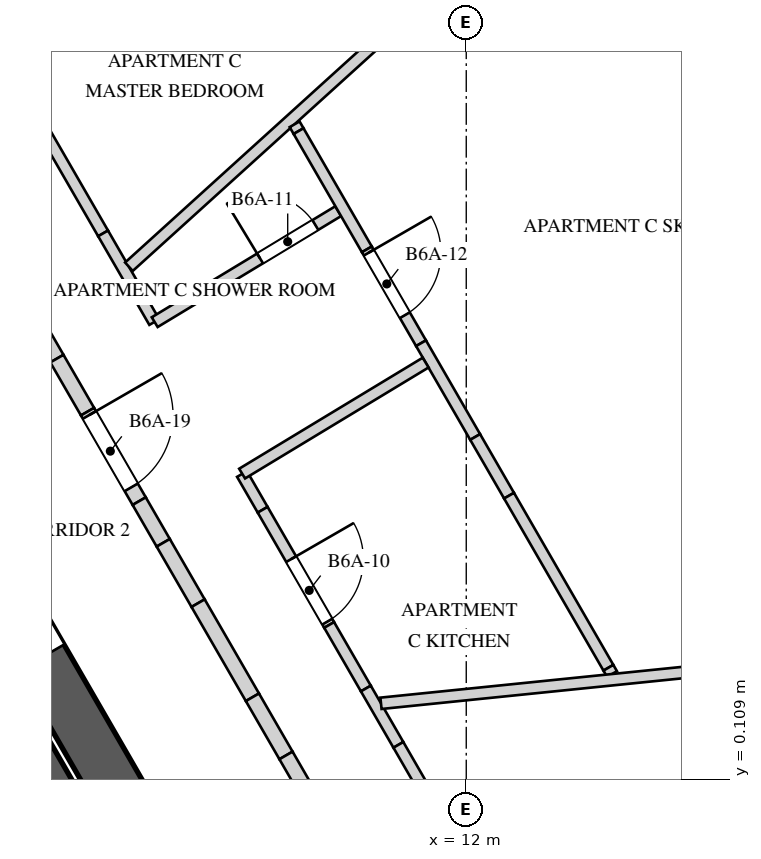
"""IFC4 building model, lengths in metres.
Left out: names, types, materials, properties, quantities, classifications, styles, units other than length and angle.
Written with IfcOpenShell. Run it as: python <this file> out.ifc"""

import sys

from ifc_helpers import new_model, si_unit, direction, frame, frame_2d, origin, place, context, subcontext, project, spatial, polyline, rectangle, outline, extrude, element, fill, save


model = new_model("IFC4")
c1 = context("Model", 3, precision=1e-05, world=origin(), true_north=direction((0.0, 1.0)))
c2 = subcontext(c1, "Body", "Model", "MODEL_VIEW")
j1 = project(units=[si_unit("LENGTHUNIT", "METRE"), si_unit("PLANEANGLEUNIT", "RADIAN")], contexts=[c1])
p1 = place(None, origin())
s1 = spatial("IfcSite", under=j1, at=p1, CompositionType="ELEMENT")
p2 = place(p1, origin())
s2 = spatial("IfcBuilding", under=s1, at=p2, CompositionType="ELEMENT")
p3 = place(p2, frame((0.0, 0.0, 245.2)))
s3 = spatial("IfcBuildingStorey", under=s2, at=p3, CompositionType="ELEMENT", Elevation=245.2)
p4 = place(p3, frame((9.844, -4.25, 0.0), z_axis=(0.0, 0.0, 1.0), x_axis=(-0.500003331888, 0.866023480109, 0.0)))
e1 = element("IfcWall", 1, at=p4, inside=s3, PredefinedType="SHEAR", context=c2, shape_type="SweptSolid", body=[
    extrude(rectangle(XDim=17.205, YDim=0.7, at=frame_2d((8.603, 0.0))), origin(), (0.0, 0.0, 1.0), 4.0),
])
p5 = place(p4, frame((6.877, 0.0, 0.0)))
e2 = element("IfcOpeningElement", 2, at=p5, cuts=e1, PredefinedType="OPENING", context=c2, shape_type="SweptSolid", body=[
    extrude(rectangle(XDim=1.0, YDim=2.4, at=frame_2d((0.5, 1.2))), frame((0.0, 0.36, 0.0), z_axis=(0.0, -1.0, 0.0), x_axis=(1.0, 0.0, 0.0)), (0.0, 0.0, 1.0), 0.72),
])
p6 = place(p3, frame((8.933, -4.172, 0.0), z_axis=(0.0, 0.0, 1.0), x_axis=(-0.500026960575, 0.86600983753, 0.0)))
e3 = element("IfcWall", 3, at=p6, inside=s3, PredefinedType="SOLIDWALL", context=c2, shape_type="SweptSolid", body=[
    extrude(rectangle(XDim=6.2, YDim=0.6, at=frame_2d((3.1, 0.0))), origin(), (0.0, 0.0, 1.0), 3.65),
])
p7 = place(p3, frame((4.934, 11.253, 0.0), z_axis=(0.0, 0.0, 1.0), x_axis=(0.500001111708, -0.866024761939, 0.0)))
e4 = element("IfcWall", 4, at=p7, inside=s3, PredefinedType="PARTITIONING", context=c2, shape_type="SweptSolid", body=[
    extrude(rectangle(XDim=4.576, YDim=0.15, at=frame_2d((2.288, 0.0))), origin(), (0.0, 0.0, 1.0), 3.65),
])
p8 = place(p7, frame((0.445, 0.0, 0.0)))
e5 = element("IfcOpeningElement", 5, at=p8, cuts=e4, PredefinedType="OPENING", context=c2, shape_type="SweptSolid", body=[
    extrude(rectangle(XDim=0.95, YDim=2.4, at=frame_2d((0.475, 1.2))), frame((0.0, 0.085, 0.0), z_axis=(0.0, -1.0, 0.0), x_axis=(1.0, 0.0, 0.0)), (0.0, 0.0, 1.0), 0.17),
])
p9 = place(p3, frame((7.222, 7.291, 0.0), z_axis=(0.0, 0.0, 1.0), x_axis=(0.500032254052, -0.866006781098, 0.0)))
e6 = element("IfcWall", 6, at=p9, inside=s3, PredefinedType="PARTITIONING", context=c2, shape_type="SweptSolid", body=[
    extrude(rectangle(XDim=0.796, YDim=0.15, at=frame_2d((0.398, 0.0))), origin(), (0.0, 0.0, 1.0), 2.75),
])
p10 = place(p3, frame((7.62, 6.602, 0.0), z_axis=(0.0, 0.0, 1.0), x_axis=(0.500093091412, -0.865971650761, 0.0)))
e7 = element("IfcWall", 7, at=p10, inside=s3, PredefinedType="PARTITIONING", context=c2, shape_type="SweptSolid", body=[
    extrude(rectangle(XDim=0.551, YDim=0.15, at=frame_2d((0.276, 0.0))), origin(), (0.0, 0.0, 1.0), 3.65),
])
p11 = place(p3, frame((7.562, 6.852, 0.0), z_axis=(0.0, 0.0, 1.0), x_axis=(0.741038665238, 0.671462356817, 0.0)))
e8 = element("IfcWall", 8, at=p11, inside=s3, PredefinedType="PARTITIONING", context=c2, shape_type="SweptSolid", body=[
    extrude(rectangle(XDim=10.057, YDim=0.15, at=frame_2d((5.028, 0.0))), origin(), (0.0, 0.0, 1.0), 2.75),
])
p12 = place(p3, frame((7.901, 6.123, 0.0), z_axis=(0.0, 0.0, 1.0), x_axis=(0.855708816302, 0.517457652087, 0.0)))
e9 = element("IfcWall", 9, at=p12, inside=s3, PredefinedType="PARTITIONING", context=c2, shape_type="SweptSolid", body=[
    extrude(rectangle(XDim=2.822, YDim=0.15, at=frame_2d((1.411, 0.0))), origin(), (0.0, 0.0, 1.0), 3.65),
])
p13 = place(p12, frame((1.62, 0.0, 0.0)))
e10 = element("IfcOpeningElement", 10, at=p13, cuts=e9, PredefinedType="OPENING", context=c2, shape_type="SweptSolid", body=[
    extrude(rectangle(XDim=0.85, YDim=2.4, at=frame_2d((0.425, 1.2))), frame((0.0, 0.085, 0.0), z_axis=(0.0, -1.0, 0.0), x_axis=(1.0, 0.0, 0.0)), (0.0, 0.0, 1.0), 0.17),
])
p14 = place(p3, frame((9.05, 4.125, 0.0), z_axis=(0.0, 0.0, 1.0), x_axis=(0.500007885066, -0.866020851292, 0.0)))
e11 = element("IfcWall", 11, at=p14, inside=s3, PredefinedType="PARTITIONING", context=c2, shape_type="SweptSolid", body=[
    extrude(rectangle(XDim=0.543, YDim=0.15, at=frame_2d((0.271, 0.0))), origin(), (0.0, 0.0, 1.0), 3.65),
])
p15 = place(p3, frame((9.321, 3.655, 0.0), z_axis=(0.0, 0.0, 1.0), x_axis=(0.499980071345, -0.866036909293, 0.0)))
e12 = element("IfcWall", 12, at=p15, inside=s3, PredefinedType="PARTITIONING", context=c2, shape_type="SweptSolid", body=[
    extrude(outline(polyline([(0.0, 0.0), (1.75, 0.0), (1.75, 3.65), (0.892, 3.65), (0.892, 2.55), (0.0, 2.55), (0.0, 0.0)])), frame((0.0, 0.075, 0.0), z_axis=(0.0, -1.0, 0.0), x_axis=(1.0, 0.0, 0.0)), (0.0, 0.0, 1.0), 0.15),
])
p16 = place(p15, frame((0.75, 0.0, 0.0)))
e13 = element("IfcOpeningElement", 13, at=p16, cuts=e12, PredefinedType="OPENING", context=c2, shape_type="SweptSolid", body=[
    extrude(rectangle(XDim=0.95, YDim=2.4, at=frame_2d((0.475, 1.2))), frame((0.0, 0.085, 0.0), z_axis=(0.0, -1.0, 0.0), x_axis=(1.0, 0.0, 0.0)), (0.0, 0.0, 1.0), 0.17),
])
p17 = place(p3, frame((10.196, 2.139, 0.0), z_axis=(0.0, 0.0, 1.0), x_axis=(0.500109093648, -0.865962409375, 0.0)))
e14 = element("IfcWall", 14, at=p17, inside=s3, PredefinedType="PARTITIONING", context=c2, shape_type="SweptSolid", body=[
    extrude(rectangle(XDim=0.966, YDim=0.15, at=frame_2d((0.483, 0.0))), origin(), (0.0, 0.0, 1.0), 3.65),
])
p18 = place(p3, frame((10.679, 1.303, 0.0), z_axis=(0.0, 0.0, 1.0), x_axis=(0.500035209441, -0.86600507465, 0.0)))
e15 = element("IfcWall", 15, at=p18, inside=s3, PredefinedType="PARTITIONING", context=c2, shape_type="SweptSolid", body=[
    extrude(rectangle(XDim=0.856, YDim=0.15, at=frame_2d((0.428, 0.0))), origin(), (0.0, 0.0, 1.0), 2.75),
])
p19 = place(p3, frame((11.107, 0.562, 0.0), z_axis=(0.0, 0.0, 1.0), x_axis=(0.499981090573, -0.866036320872, 0.0)))
e16 = element("IfcWall", 16, at=p19, inside=s3, PredefinedType="PARTITIONING", context=c2, shape_type="SweptSolid", body=[
    extrude(rectangle(XDim=5.556, YDim=0.15, at=frame_2d((2.778, 0.0))), origin(), (0.0, 0.0, 1.0), 3.65),
])
p20 = place(p19, frame((1.971, 0.0, 0.0)))
e17 = element("IfcOpeningElement", 17, at=p20, cuts=e16, PredefinedType="OPENING", context=c2, shape_type="SweptSolid", body=[
    extrude(rectangle(XDim=0.95, YDim=2.4, at=frame_2d((0.475, 1.2))), frame((0.0, 0.085, 0.0), z_axis=(0.0, -1.0, 0.0), x_axis=(1.0, 0.0, 0.0)), (0.0, 0.0, 1.0), 0.17),
])
p21 = place(p3, frame((9.742, 8.726, 0.0), z_axis=(0.0, 0.0, 1.0), x_axis=(0.500943559977, -0.865479953388, 0.0)))
e18 = element("IfcWall", 18, at=p21, inside=s3, PredefinedType="PARTITIONING", context=c2, shape_type="SweptSolid", body=[
    extrude(rectangle(XDim=0.104, YDim=0.15, at=frame_2d((0.052, 0.0))), origin(), (0.0, 0.0, 1.0), 2.75),
])
p22 = place(p3, frame((9.794, 8.636, 0.0), z_axis=(0.0, 0.0, 1.0), x_axis=(0.499953802258, -0.86605207442, 0.0)))
e19 = element("IfcWall", 19, at=p22, inside=s3, PredefinedType="PARTITIONING", context=c2, shape_type="SweptSolid", body=[
    extrude(rectangle(XDim=1.797, YDim=0.15, at=frame_2d((0.898, 0.0))), origin(), (0.0, 0.0, 1.0), 3.65),
])
p23 = place(p3, frame((10.692, 7.081, 0.0), z_axis=(0.0, 0.0, 1.0), x_axis=(0.499969479948, -0.866043023828, 0.0)))
e20 = element("IfcWall", 20, at=p23, inside=s3, PredefinedType="PARTITIONING", context=c2, shape_type="SweptSolid", body=[
    extrude(outline(polyline([(0.0, 0.0), (1.426, 0.0), (1.426, 2.55), (0.551, 2.55), (0.551, 3.65), (0.0, 3.65), (0.0, 0.0)])), frame((0.0, 0.075, 0.0), z_axis=(0.0, -1.0, 0.0), x_axis=(1.0, 0.0, 0.0)), (0.0, 0.0, 1.0), 0.15),
])
p24 = place(p23, frame((0.05, 0.0, 0.0)))
e21 = element("IfcOpeningElement", 21, at=p24, cuts=e20, PredefinedType="OPENING", context=c2, shape_type="SweptSolid", body=[
    extrude(rectangle(XDim=0.95, YDim=2.4, at=frame_2d((0.475, 1.2))), frame((0.0, 0.085, 0.0), z_axis=(0.0, -1.0, 0.0), x_axis=(1.0, 0.0, 0.0)), (0.0, 0.0, 1.0), 0.17),
])
p25 = place(p3, frame((11.405, 5.846, 0.0), z_axis=(0.0, 0.0, 1.0), x_axis=(0.500103350459, -0.865965726146, 0.0)))
e22 = element("IfcWall", 22, at=p25, inside=s3, PredefinedType="PARTITIONING", context=c2, shape_type="SweptSolid", body=[
    extrude(rectangle(XDim=1.424, YDim=0.15, at=frame_2d((0.712, 0.0))), origin(), (0.0, 0.0, 1.0), 3.65),
])
p26 = place(p3, frame((12.117, 4.613, 0.0), z_axis=(0.0, 0.0, 1.0), x_axis=(0.499967368674, -0.86604424267, 0.0)))
e23 = element("IfcWall", 23, at=p26, inside=s3, PredefinedType="PARTITIONING", context=c2, shape_type="SweptSolid", body=[
    extrude(rectangle(XDim=0.892, YDim=0.15, at=frame_2d((0.446, 0.0))), origin(), (0.0, 0.0, 1.0), 2.55),
])
p27 = place(p3, frame((12.563, 3.84, 0.0), z_axis=(0.0, 0.0, 1.0), x_axis=(0.500016176693, -0.866016063965, 0.0)))
e24 = element("IfcWall", 24, at=p27, inside=s3, PredefinedType="PARTITIONING", context=c2, shape_type="SweptSolid", body=[
    extrude(rectangle(XDim=2.614, YDim=0.15, at=frame_2d((1.307, 0.0))), origin(), (0.0, 0.0, 1.0), 3.65),
])
p28 = place(p3, frame((13.87, 1.576, 0.0), z_axis=(0.0, 0.0, 1.0), x_axis=(0.49972245349, -0.866185586049, 0.0)))
e25 = element("IfcWall", 25, at=p28, inside=s3, PredefinedType="PARTITIONING", context=c2, shape_type="SweptSolid", body=[
    extrude(rectangle(XDim=0.095, YDim=0.15, at=frame_2d((0.048, 0.0))), origin(), (0.0, 0.0, 1.0), 2.75),
])
p29 = place(p3, frame((11.466, 5.591, 0.0), z_axis=(0.0, 0.0, 1.0), x_axis=(-0.855670500176, -0.517521009359, 0.0)))
e26 = element("IfcWall", 26, at=p29, inside=s3, PredefinedType="PARTITIONING", context=c2, shape_type="SweptSolid", body=[
    extrude(rectangle(XDim=2.822, YDim=0.15, at=frame_2d((1.411, 0.0))), origin(), (0.0, 0.0, 1.0), 3.65),
])
p30 = place(p3, frame((20.157, 2.054, 0.0), z_axis=(0.0, 0.0, 1.0), x_axis=(-0.994848051669, -0.101377285871, 0.0)))
e27 = element("IfcWall", 27, at=p30, inside=s3, PredefinedType="PARTITIONING", context=c2, shape_type="SweptSolid", body=[
    extrude(rectangle(XDim=9.327, YDim=0.15, at=frame_2d((4.664, 0.0))), origin(), (0.0, 0.0, 1.0), 2.75),
])
p31 = place(p3, frame((6.204, 6.355, 0.0), z_axis=(0.0, 0.0, 1.0), x_axis=(0.499911126926, -0.866076708598, 0.0)))
e28 = element("IfcWall", 28, at=p31, inside=s3, PredefinedType="SOLIDWALL", context=c2, shape_type="SweptSolid", body=[
    extrude(rectangle(XDim=0.822, YDim=0.2, at=frame_2d((0.411, 0.0))), origin(), (0.0, 0.0, 1.0), 2.75),
])
p32 = place(p3, frame((6.615, 5.643, 0.0), z_axis=(0.0, 0.0, 1.0), x_axis=(0.499984757355, -0.866034203951, 0.0)))
e29 = element("IfcWall", 29, at=p32, inside=s3, PredefinedType="SOLIDWALL", context=c2, shape_type="SweptSolid", body=[
    extrude(rectangle(XDim=0.806, YDim=0.2, at=frame_2d((0.403, 0.0))), origin(), (0.0, 0.0, 1.0), 3.65),
])
p33 = place(p3, frame((7.017, 4.946, 0.0), z_axis=(0.0, 0.0, 1.0), x_axis=(0.499924531544, -0.866068971134, 0.0)))
e30 = element("IfcWall", 30, at=p33, inside=s3, PredefinedType="SOLIDWALL", context=c2, shape_type="SweptSolid", body=[
    extrude(outline(polyline([(0.0, 0.0), (1.36, 0.0), (1.359, 2.55), (0.459, 2.55), (0.459, 3.65), (0.0, 3.65), (0.0, 0.0)])), frame((0.0, 0.1, 0.0), z_axis=(0.0, -1.0, 0.0), x_axis=(1.0, 0.0, 0.0)), (0.0, 0.0, 1.0), 0.2),
])
p34 = place(p33, frame((0.05, 0.0, 0.0)))
e31 = element("IfcOpeningElement", 31, at=p34, cuts=e30, PredefinedType="OPENING", context=c2, shape_type="SweptSolid", body=[
    extrude(rectangle(XDim=1.1, YDim=2.4, at=frame_2d((0.55, 1.2))), frame((0.0, 0.11, 0.0), z_axis=(0.0, -1.0, 0.0), x_axis=(1.0, 0.0, 0.0)), (0.0, 0.0, 1.0), 0.22),
])
p35 = place(p3, frame((7.697, 3.768, 0.0), z_axis=(0.0, 0.0, 1.0), x_axis=(0.50012328804, -0.865954211699, 0.0)))
e32 = element("IfcWall", 32, at=p35, inside=s3, PredefinedType="SOLIDWALL", context=c2, shape_type="SweptSolid", body=[
    extrude(rectangle(XDim=0.633, YDim=0.2, at=frame_2d((0.316, 0.0))), origin(), (0.0, 0.0, 1.0), 3.65),
])
p36 = place(p3, frame((8.013, 3.22, 0.0), z_axis=(0.0, 0.0, 1.0), x_axis=(0.500175591747, -0.865924002104, 0.0)))
e33 = element("IfcWall", 33, at=p36, inside=s3, PredefinedType="SOLIDWALL", context=c2, shape_type="SweptSolid", body=[
    extrude(rectangle(XDim=0.917, YDim=0.2, at=frame_2d((0.458, 0.0))), origin(), (0.0, 0.0, 1.0), 2.55),
])
p37 = place(p3, frame((8.472, 2.426, 0.0), z_axis=(0.0, 0.0, 1.0), x_axis=(0.499904796234, -0.866080362727, 0.0)))
e34 = element("IfcWall", 34, at=p37, inside=s3, PredefinedType="SOLIDWALL", context=c2, shape_type="SweptSolid", body=[
    extrude(rectangle(XDim=1.429, YDim=0.2, at=frame_2d((0.715, 0.0))), origin(), (0.0, 0.0, 1.0), 3.65),
])
p38 = place(p3, frame((9.187, 1.188, 0.0), z_axis=(0.0, 0.0, 1.0), x_axis=(0.500121072013, -0.86595549154, 0.0)))
e35 = element("IfcWall", 35, at=p38, inside=s3, PredefinedType="SOLIDWALL", context=c2, shape_type="SweptSolid", body=[
    extrude(rectangle(XDim=0.884, YDim=0.2, at=frame_2d((0.442, 0.0))), origin(), (0.0, 0.0, 1.0), 2.75),
])
p39 = place(p3, frame((9.629, 0.423, 0.0), z_axis=(0.0, 0.0, 1.0), x_axis=(0.499995433041, -0.866028040503, 0.0)))
e36 = element("IfcWall", 36, at=p39, inside=s3, PredefinedType="SOLIDWALL", context=c2, shape_type="SweptSolid", body=[
    extrude(rectangle(XDim=5.161, YDim=0.2, at=frame_2d((2.581, 0.0))), origin(), (0.0, 0.0, 1.0), 3.65),
])
p40 = place(p16, origin())
e37 = element("IfcDoor", 37, at=p40, inside=s3, OperationType="SINGLE_SWING_RIGHT", PredefinedType="DOOR", context=c2, shape_type="SweptSolid", body=[
    extrude(rectangle(XDim=0.95, YDim=2.4, at=frame_2d((0.475, 1.2))), frame((0.0, 0.025, 0.0), z_axis=(0.0, -1.0, 0.0), x_axis=(1.0, 0.0, 0.0)), (0.0, 0.0, 1.0), 0.05),
])
fill(e13, e37)
p41 = place(p13, origin())
e38 = element("IfcDoor", 38, at=p41, inside=s3, OperationType="SINGLE_SWING_LEFT", PredefinedType="DOOR", context=c2, shape_type="SweptSolid", body=[
    extrude(rectangle(XDim=0.85, YDim=2.4, at=frame_2d((0.425, 1.2))), frame((0.0, 0.025, 0.0), z_axis=(0.0, -1.0, 0.0), x_axis=(1.0, 0.0, 0.0)), (0.0, 0.0, 1.0), 0.05),
])
fill(e10, e38)
p42 = place(p24, origin())
e39 = element("IfcDoor", 39, at=p42, inside=s3, OperationType="SINGLE_SWING_RIGHT", PredefinedType="DOOR", context=c2, shape_type="SweptSolid", body=[
    extrude(rectangle(XDim=0.95, YDim=2.4, at=frame_2d((0.475, 1.2))), frame((0.0, 0.025, 0.0), z_axis=(0.0, -1.0, 0.0), x_axis=(1.0, 0.0, 0.0)), (0.0, 0.0, 1.0), 0.05),
])
fill(e21, e39)
p43 = place(p34, origin())
e40 = element("IfcDoor", 40, at=p43, inside=s3, OperationType="SINGLE_SWING_LEFT", PredefinedType="DOOR", context=c2, shape_type="SweptSolid", body=[
    extrude(rectangle(XDim=1.1, YDim=2.4, at=frame_2d((0.55, 1.2))), frame((0.0, 0.025, 0.0), z_axis=(0.0, -1.0, 0.0), x_axis=(1.0, 0.0, 0.0)), (0.0, 0.0, 1.0), 0.05),
])
fill(e31, e40)
save(model, sys.argv[1])
